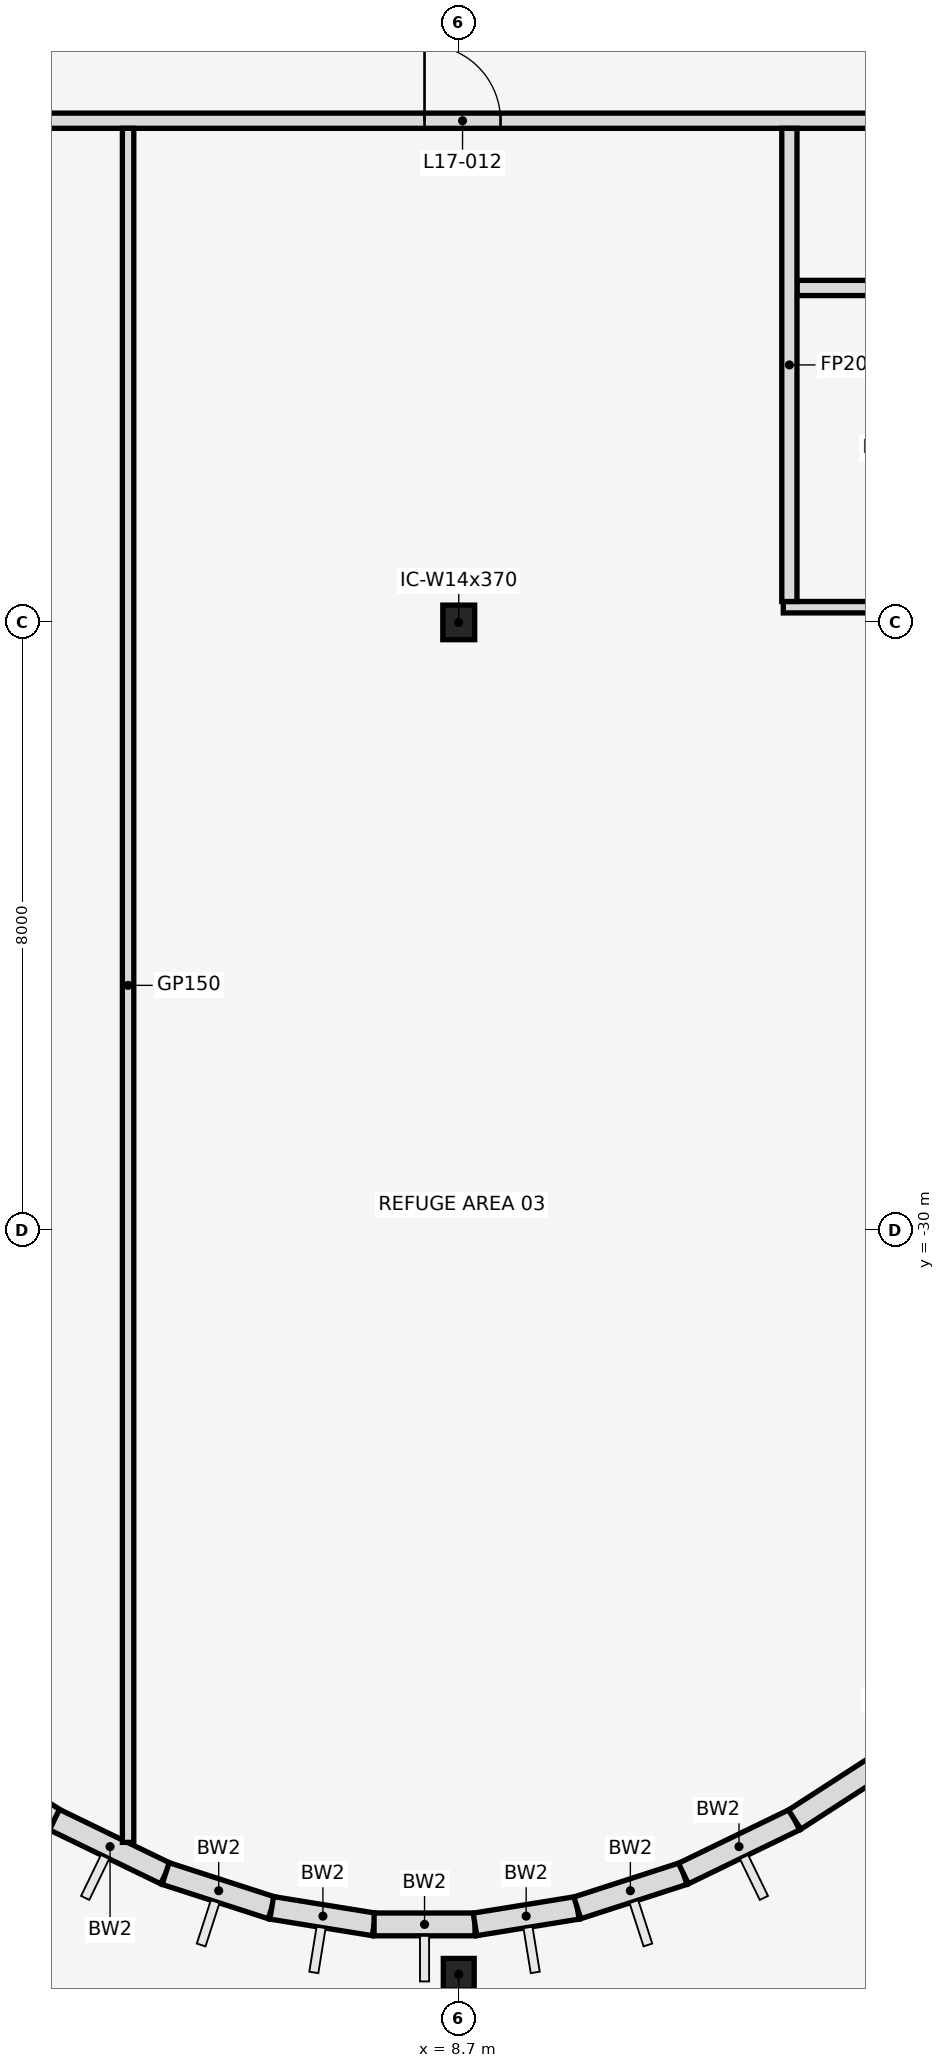
"""IFC4 building model, lengths in metres.
Left out: names, types, materials, properties, quantities, classifications, styles, units other than length and angle.
Written with IfcOpenShell. Run it as: python <this file> out.ifc"""

import sys

from ifc_helpers import new_model, si_unit, direction, frame, frame_2d, origin, origin_2d, place, context, subcontext, project, spatial, rectangle, i_section, extrude, element, fill, save


model = new_model("IFC4")
c1 = context("Model", 3, precision=1e-05, world=origin(), true_north=direction((0.0, 1.0)))
c2 = subcontext(c1, "Body", "Model", "MODEL_VIEW")
j1 = project(units=[si_unit("LENGTHUNIT", "METRE"), si_unit("PLANEANGLEUNIT", "RADIAN")], contexts=[c1])
p1 = place(None, origin())
s1 = spatial("IfcSite", under=j1, at=p1, CompositionType="ELEMENT")
p2 = place(p1, origin())
s2 = spatial("IfcBuilding", under=s1, at=p2, CompositionType="ELEMENT")
p3 = place(p2, frame((0.0, 0.0, 84.5)))
s3 = spatial("IfcBuildingStorey", under=s2, at=p3, CompositionType="ELEMENT", Elevation=84.5)
p4 = place(p3, frame((8.7, -39.785, 0.0), z_axis=(0.0, 0.0, 1.0), x_axis=(1.0, 0.0, 0.0)))
e1 = element("IfcColumn", 1, at=p4, inside=s3, PredefinedType="COLUMN", context=c2, shape_type="SweptSolid", body=[
    extrude(i_section(OverallWidth=0.406, OverallDepth=0.417, WebThickness=0.03, FlangeThickness=0.048, at=origin_2d()), origin(), (0.0, 0.0, 1.0), 5.4),
])
p5 = place(p3, frame((8.7, -22.0, 0.0), z_axis=(0.0, 0.0, 1.0), x_axis=(1.0, 0.0, 0.0)))
e2 = element("IfcColumn", 2, at=p5, inside=s3, PredefinedType="COLUMN", context=c2, shape_type="SweptSolid", body=[
    extrude(i_section(OverallWidth=0.419, OverallDepth=0.455, WebThickness=0.042, FlangeThickness=0.068, at=origin_2d()), origin(), (0.0, 0.0, 1.0), 5.4),
])
p6 = place(p3, frame((0.081, -35.618, 0.0), z_axis=(0.0, 0.0, 1.0), x_axis=(0.839805110115, -0.542887996759, 0.0)))
e3 = element("IfcWall", 3, at=p6, inside=s3, PredefinedType="STANDARD", context=c2, shape_type="SweptSolid", body=[
    extrude(rectangle(XDim=3.929, YDim=0.3, at=frame_2d((1.965, 0.0))), origin(), (0.0, 0.0, 1.0), 4.572),
])
p7 = place(p3, frame((3.381, -37.751, 0.0), z_axis=(0.0, 0.0, 1.0), x_axis=(0.899798026589, -0.436306671214, 0.0)))
e4 = element("IfcWall", 4, at=p7, inside=s3, PredefinedType="STANDARD", context=c2, shape_type="SweptSolid", body=[
    extrude(rectangle(XDim=1.625, YDim=0.3, at=frame_2d((0.813, 0.0))), origin(), (0.0, 0.0, 1.0), 4.496),
])
p8 = place(p3, frame((4.844, -38.46, 0.0), z_axis=(0.0, 0.0, 1.0), x_axis=(0.951539081691, -0.307527845919, 0.0)))
e5 = element("IfcWall", 5, at=p8, inside=s3, PredefinedType="STANDARD", context=c2, shape_type="SweptSolid", body=[
    extrude(rectangle(XDim=1.467, YDim=0.3, at=frame_2d((0.733, 0.0))), origin(), (0.0, 0.0, 1.0), 5.25),
])
p9 = place(p3, frame((6.24, -38.911, 0.0), z_axis=(0.0, 0.0, 1.0), x_axis=(0.987194777017, -0.15951950423, 0.0)))
e6 = element("IfcWall", 6, at=p9, inside=s3, PredefinedType="STANDARD", context=c2, shape_type="SweptSolid", body=[
    extrude(rectangle(XDim=1.364, YDim=0.3, at=frame_2d((0.682, 0.0))), origin(), (0.0, 0.0, 1.0), 5.25),
])
p10 = place(p3, frame((7.586, -39.129, 0.0), z_axis=(0.0, 0.0, 1.0), x_axis=(1.0, 0.0, 0.0)))
e7 = element("IfcWall", 7, at=p10, inside=s3, PredefinedType="STANDARD", context=c2, shape_type="SweptSolid", body=[
    extrude(rectangle(XDim=1.328, YDim=0.3, at=frame_2d((0.664, 0.0))), origin(), (0.0, 0.0, 1.0), 4.414),
])
p11 = place(p3, frame((8.914, -39.129, 0.0), z_axis=(0.0, 0.0, 1.0), x_axis=(0.987194777017, 0.15951950423, 0.0)))
e8 = element("IfcWall", 8, at=p11, inside=s3, PredefinedType="STANDARD", context=c2, shape_type="SweptSolid", body=[
    extrude(rectangle(XDim=1.364, YDim=0.3, at=frame_2d((0.682, 0.0))), origin(), (0.0, 0.0, 1.0), 4.414),
])
p12 = place(p3, frame((10.26, -38.911, 0.0), z_axis=(0.0, 0.0, 1.0), x_axis=(0.951539081691, 0.307527845919, 0.0)))
e9 = element("IfcWall", 9, at=p12, inside=s3, PredefinedType="STANDARD", context=c2, shape_type="SweptSolid", body=[
    extrude(rectangle(XDim=1.467, YDim=0.3, at=frame_2d((0.733, 0.0))), origin(), (0.0, 0.0, 1.0), 5.25),
])
p13 = place(p3, frame((11.656, -38.46, 0.0), z_axis=(0.0, 0.0, 1.0), x_axis=(0.899798026589, 0.436306671214, 0.0)))
e10 = element("IfcWall", 10, at=p13, inside=s3, PredefinedType="STANDARD", context=c2, shape_type="SweptSolid", body=[
    extrude(rectangle(XDim=1.625, YDim=0.3, at=frame_2d((0.813, 0.0))), origin(), (0.0, 0.0, 1.0), 4.496),
])
p14 = place(p3, frame((13.119, -37.751, 0.0), z_axis=(0.0, 0.0, 1.0), x_axis=(0.839779682339, 0.542927329512, 0.0)))
e11 = element("IfcWall", 11, at=p14, inside=s3, PredefinedType="STANDARD", context=c2, shape_type="SweptSolid", body=[
    extrude(rectangle(XDim=2.875, YDim=0.3, at=frame_2d((1.438, 0.0))), origin(), (0.0, 0.0, 1.0), 4.496),
])
p15 = place(p3, frame((12.97, -21.8, 0.0), z_axis=(0.0, 0.0, 1.0), x_axis=(1.0, 0.0, 0.0)))
e12 = element("IfcWall", 12, at=p15, inside=s3, PredefinedType="PARTITIONING", context=c2, shape_type="SweptSolid", body=[
    extrude(rectangle(XDim=3.335, YDim=0.15, at=frame_2d((1.667, 0.0))), origin(), (0.0, 0.0, 1.0), 4.318),
])
p16 = place(p3, frame((13.15, -17.6, 0.0), z_axis=(0.0, 0.0, 1.0), x_axis=(1.0, 0.0, 0.0)))
e13 = element("IfcWall", 13, at=p16, inside=s3, PredefinedType="PARTITIONING", context=c2, shape_type="SweptSolid", body=[
    extrude(rectangle(XDim=8.5, YDim=0.2, at=frame_2d((4.25, 0.0))), origin(), (0.0, 0.0, 1.0), 4.318),
])
p17 = place(p16, frame((1.1, 0.0, 0.0)))
e14 = element("IfcOpeningElement", 14, at=p17, cuts=e13, PredefinedType="OPENING", context=c2, shape_type="SweptSolid", body=[
    extrude(rectangle(XDim=0.9, YDim=2.1, at=frame_2d((0.45, 1.05))), frame((0.0, 0.112, 0.0), z_axis=(0.0, -1.0, 0.0), x_axis=(1.0, 0.0, 0.0)), (0.0, 0.0, 1.0), 0.224),
])
p18 = place(p16, frame((4.3, 0.0, 0.0)))
e15 = element("IfcOpeningElement", 15, at=p18, cuts=e13, PredefinedType="OPENING", context=c2, shape_type="SweptSolid", body=[
    extrude(rectangle(XDim=0.9, YDim=2.1, at=frame_2d((0.45, 1.05))), frame((0.0, 0.112, 0.0), z_axis=(0.0, -1.0, 0.0), x_axis=(1.0, 0.0, 0.0)), (0.0, 0.0, 1.0), 0.224),
])
p19 = place(p16, frame((6.9, 0.0, 0.0)))
e16 = element("IfcOpeningElement", 16, at=p19, cuts=e13, PredefinedType="OPENING", context=c2, shape_type="SweptSolid", body=[
    extrude(rectangle(XDim=1.0, YDim=2.1, at=frame_2d((0.5, 1.05))), frame((0.0, 0.112, 0.0), z_axis=(0.0, -1.0, 0.0), x_axis=(1.0, 0.0, 0.0)), (0.0, 0.0, 1.0), 0.224),
])
p20 = place(p3, frame((-32.7, -15.4, 0.0), z_axis=(0.0, 0.0, 1.0), x_axis=(1.0, 0.0, 0.0)))
e17 = element("IfcWall", 17, at=p20, inside=s3, PredefinedType="PARTITIONING", context=c2, shape_type="SweptSolid", body=[
    extrude(rectangle(XDim=65.4, YDim=0.2, at=frame_2d((32.7, 0.0))), origin(), (0.0, 0.0, 1.0), 4.318),
])
p21 = place(p20, frame((0.7, 0.0, 0.0)))
e18 = element("IfcOpeningElement", 18, at=p21, cuts=e17, PredefinedType="OPENING", context=c2, shape_type="SweptSolid", body=[
    extrude(rectangle(XDim=0.9, YDim=2.1, at=frame_2d((0.45, 1.05))), frame((0.0, 0.112, 0.0), z_axis=(0.0, -1.0, 0.0), x_axis=(1.0, 0.0, 0.0)), (0.0, 0.0, 1.0), 0.224),
])
p22 = place(p20, frame((6.05, 0.0, 0.0)))
e19 = element("IfcOpeningElement", 19, at=p22, cuts=e17, PredefinedType="OPENING", context=c2, shape_type="SweptSolid", body=[
    extrude(rectangle(XDim=1.0, YDim=2.1, at=frame_2d((0.5, 1.05))), frame((0.0, 0.112, 0.0), z_axis=(0.0, -1.0, 0.0), x_axis=(1.0, 0.0, 0.0)), (0.0, 0.0, 1.0), 0.224),
])
p23 = place(p20, frame((14.85, 0.0, 0.0)))
e20 = element("IfcOpeningElement", 20, at=p23, cuts=e17, PredefinedType="OPENING", context=c2, shape_type="SweptSolid", body=[
    extrude(rectangle(XDim=1.0, YDim=2.1, at=frame_2d((0.5, 1.05))), frame((0.0, 0.112, 0.0), z_axis=(0.0, -1.0, 0.0), x_axis=(1.0, 0.0, 0.0)), (0.0, 0.0, 1.0), 0.224),
])
p24 = place(p20, frame((23.55, 0.0, 0.0)))
e21 = element("IfcOpeningElement", 21, at=p24, cuts=e17, PredefinedType="OPENING", context=c2, shape_type="SweptSolid", body=[
    extrude(rectangle(XDim=1.0, YDim=2.1, at=frame_2d((0.5, 1.05))), frame((0.0, 0.112, 0.0), z_axis=(0.0, -1.0, 0.0), x_axis=(1.0, 0.0, 0.0)), (0.0, 0.0, 1.0), 0.224),
])
p25 = place(p20, frame((32.15, 0.0, 0.0)))
e22 = element("IfcOpeningElement", 22, at=p25, cuts=e17, PredefinedType="OPENING", context=c2, shape_type="SweptSolid", body=[
    extrude(rectangle(XDim=1.0, YDim=2.1, at=frame_2d((0.5, 1.05))), frame((0.0, 0.112, 0.0), z_axis=(0.0, -1.0, 0.0), x_axis=(1.0, 0.0, 0.0)), (0.0, 0.0, 1.0), 0.224),
])
p26 = place(p20, frame((40.95, 0.0, 0.0)))
e23 = element("IfcOpeningElement", 23, at=p26, cuts=e17, PredefinedType="OPENING", context=c2, shape_type="SweptSolid", body=[
    extrude(rectangle(XDim=1.0, YDim=2.1, at=frame_2d((0.5, 1.05))), frame((0.0, 0.112, 0.0), z_axis=(0.0, -1.0, 0.0), x_axis=(1.0, 0.0, 0.0)), (0.0, 0.0, 1.0), 0.224),
])
p27 = place(p20, frame((49.65, 0.0, 0.0)))
e24 = element("IfcOpeningElement", 24, at=p27, cuts=e17, PredefinedType="OPENING", context=c2, shape_type="SweptSolid", body=[
    extrude(rectangle(XDim=0.9, YDim=2.1, at=frame_2d((0.45, 1.05))), frame((0.0, 0.112, 0.0), z_axis=(0.0, -1.0, 0.0), x_axis=(1.0, 0.0, 0.0)), (0.0, 0.0, 1.0), 0.224),
])
p28 = place(p20, frame((58.35, 0.0, 0.0)))
e25 = element("IfcOpeningElement", 25, at=p28, cuts=e17, PredefinedType="OPENING", context=c2, shape_type="SweptSolid", body=[
    extrude(rectangle(XDim=1.0, YDim=2.1, at=frame_2d((0.5, 1.05))), frame((0.0, 0.112, 0.0), z_axis=(0.0, -1.0, 0.0), x_axis=(1.0, 0.0, 0.0)), (0.0, 0.0, 1.0), 0.224),
])
p29 = place(p20, frame((63.85, 0.0, 0.0)))
e26 = element("IfcOpeningElement", 26, at=p29, cuts=e17, PredefinedType="OPENING", context=c2, shape_type="SweptSolid", body=[
    extrude(rectangle(XDim=0.9, YDim=2.1, at=frame_2d((0.45, 1.05))), frame((0.0, 0.112, 0.0), z_axis=(0.0, -1.0, 0.0), x_axis=(1.0, 0.0, 0.0)), (0.0, 0.0, 1.0), 0.224),
])
p30 = place(p3, frame((4.35, -38.05, 0.0), z_axis=(0.0, 0.0, 1.0), x_axis=(0.0, 1.0, 0.0)))
e27 = element("IfcWall", 27, at=p30, inside=s3, PredefinedType="PARTITIONING", context=c2, shape_type="SweptSolid", body=[
    extrude(rectangle(XDim=22.55, YDim=0.15, at=frame_2d((11.275, 0.0))), origin(), (0.0, 0.0, 1.0), 4.318),
])
p31 = place(p3, frame((13.05, -21.725, 0.0), z_axis=(0.0, 0.0, 1.0), x_axis=(0.0, 1.0, 0.0)))
e28 = element("IfcWall", 28, at=p31, inside=s3, PredefinedType="PARTITIONING", context=c2, shape_type="SweptSolid", body=[
    extrude(rectangle(XDim=6.225, YDim=0.2, at=frame_2d((3.113, 0.0))), origin(), (0.0, 0.0, 1.0), 4.318),
])
p32 = place(p26, frame((1.0, 0.0, 0.0), z_axis=(0.0, 0.0, 1.0), x_axis=(-1.0, 0.0, 0.0)))
e29 = element("IfcDoor", 29, at=p32, inside=s3, OperationType="SINGLE_SWING_RIGHT", PredefinedType="DOOR", context=c2, shape_type="SweptSolid", body=[
    extrude(rectangle(XDim=1.0, YDim=2.1, at=frame_2d((0.5, 1.05))), frame((0.0, 0.025, 0.0), z_axis=(0.0, -1.0, 0.0), x_axis=(1.0, 0.0, 0.0)), (0.0, 0.0, 1.0), 0.05),
])
fill(e23, e29)
save(model, sys.argv[1])
